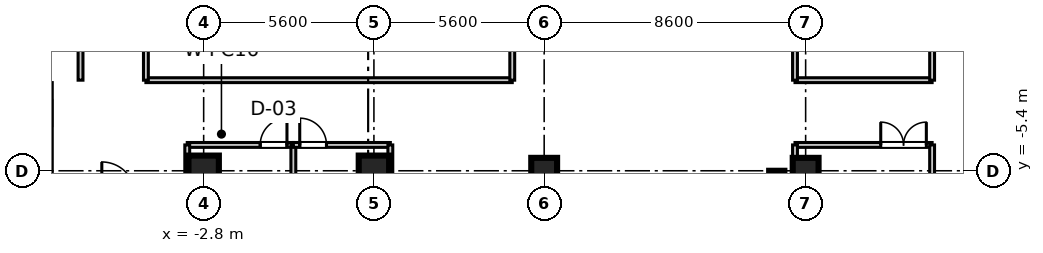
"""IFC4 building model, lengths in metres.
Left out: names, types, materials, properties, quantities, classifications, styles, units other than length and angle.
Written with IfcOpenShell. Run it as: python <this file> out.ifc"""

import sys

from ifc_helpers import new_model, si_unit, direction, frame, frame_2d, origin, origin_2d, place, context, subcontext, project, spatial, rectangle, extrude, source, transform, mapped, element, fill, save


model = new_model("IFC4")
c1 = context("Model", 3, precision=1e-05, world=origin(), true_north=direction((0.0, 1.0)))
c2 = subcontext(c1, "Body", "Model", "MODEL_VIEW")
j1 = project(units=[si_unit("LENGTHUNIT", "METRE"), si_unit("PLANEANGLEUNIT", "RADIAN")], contexts=[c1])
p1 = place(None, origin())
s1 = spatial("IfcSite", under=j1, at=p1, CompositionType="ELEMENT")
p2 = place(p1, origin())
s2 = spatial("IfcBuilding", under=s1, at=p2, CompositionType="ELEMENT")
p3 = place(p2, frame((0.0, 0.0, 249.3)))
s3 = spatial("IfcBuildingStorey", under=s2, at=p3, CompositionType="ELEMENT", Elevation=249.3)
m1 = source(origin(), c2, "Body", "SweptSolid", [
    extrude(rectangle(XDim=1.0, YDim=1.0, at=origin_2d()), origin(), (0.0, 0.0, 1.0), 3.655),
])
for number, where, z_axis, x_axis in (
    (1, (-2.8, -5.4, 0.0), (0.0, 0.0, 1.0), (1.0, 0.0, 0.0)),
    (2, (2.8, -5.4, 0.0), (0.0, 0.0, 1.0), (1.0, 0.0, 0.0)),
):
    element("IfcColumn", number, at=place(p3, frame(where, z_axis=z_axis, x_axis=x_axis)), inside=s3, PredefinedType="COLUMN", context=c2, shape_type="MappedRepresentation", body=[
        mapped(m1, transform((0.0, 0.0, 0.0), scale=1.0)),
    ])
m2 = source(origin(), c2, "Body", "SweptSolid", [
    extrude(rectangle(XDim=0.85, YDim=0.85, at=origin_2d()), origin(), (0.0, 0.0, 1.0), 3.655),
])
for number, where, z_axis, x_axis in (
    (3, (8.4, -5.4, 0.0), (0.0, 0.0, 1.0), (1.0, 0.0, 0.0)),
    (4, (17.0, -5.4, 0.0), (0.0, 0.0, 1.0), (1.0, 0.0, 0.0)),
):
    element("IfcColumn", number, at=place(p3, frame(where, z_axis=z_axis, x_axis=x_axis)), inside=s3, PredefinedType="PILASTER", context=c2, shape_type="MappedRepresentation", body=[
        mapped(m2, transform((0.0, 0.0, 0.0), scale=1.0)),
    ])
m3 = source(origin(), c2, "Body", "SweptSolid", [
    extrude(rectangle(XDim=11.6, YDim=0.5, at=frame_2d((5.8, 0.0))), origin(), (0.0, 0.0, 1.0), 3.41),
])
p4 = place(p3, frame((16.05, -17.0, 0.0), z_axis=(0.0, 0.0, 1.0), x_axis=(0.0, 1.0, 0.0)))
e5 = element("IfcWall", 5, at=p4, inside=s3, PredefinedType="SHEAR", context=c2, shape_type="MappedRepresentation", body=[
    mapped(m3, transform((0.0, 0.0, 0.0), scale=1.0)),
])
m4 = source(origin(), c2, "Body", "SweptSolid", [
    extrude(rectangle(XDim=4.51, YDim=0.16, at=frame_2d((2.255, 0.0))), origin(), (0.0, 0.0, 1.0), 2.75),
])
p5 = place(p3, frame((16.65, -4.55, 0.0), z_axis=(0.0, 0.0, 1.0), x_axis=(1.0, 0.0, 0.0)))
e6 = element("IfcWall", 6, at=p5, inside=s3, PredefinedType="PARTITIONING", context=c2, shape_type="MappedRepresentation", body=[
    mapped(m4, transform((0.0, 0.0, 0.0), scale=1.0)),
])
p6 = place(p5, frame((2.82, 0.0, 0.0)))
e7 = element("IfcOpeningElement", 7, at=p6, cuts=e6, PredefinedType="OPENING", context=c2, shape_type="SweptSolid", body=[
    extrude(rectangle(XDim=1.5, YDim=2.15, at=frame_2d((0.75, 1.075))), frame((0.0, 0.09, 0.0), z_axis=(0.0, -1.0, 0.0), x_axis=(1.0, 0.0, 0.0)), (0.0, 0.0, 1.0), 0.18),
])
m5 = source(origin(), c2, "Body", "SweptSolid", [
    extrude(rectangle(XDim=19.35, YDim=0.16, at=frame_2d((9.675, 0.0))), origin(), (0.0, 0.0, 1.0), 2.75),
])
p7 = place(p3, frame((16.65, -23.9, 0.0), z_axis=(0.0, 0.0, 1.0), x_axis=(0.0, 1.0, 0.0)))
e8 = element("IfcWall", 8, at=p7, inside=s3, PredefinedType="PARTITIONING", context=c2, shape_type="MappedRepresentation", body=[
    mapped(m5, transform((0.0, 0.0, 0.0), scale=1.0)),
])
m6 = source(origin(), c2, "Body", "SweptSolid", [
    extrude(rectangle(XDim=17.93, YDim=0.16, at=frame_2d((8.965, 0.0))), origin(), (0.0, 0.0, 1.0), 2.75),
])
p8 = place(p3, frame((21.16, -22.48, 0.0), z_axis=(0.0, 0.0, 1.0), x_axis=(0.0, 1.0, 0.0)))
e9 = element("IfcWall", 9, at=p8, inside=s3, PredefinedType="PARTITIONING", context=c2, shape_type="MappedRepresentation", body=[
    mapped(m6, transform((0.0, 0.0, 0.0), scale=1.0)),
])
m7 = source(origin(), c2, "Body", "SweptSolid", [
    extrude(rectangle(XDim=10.7, YDim=0.16, at=frame_2d((5.35, 0.0))), origin(), (0.0, 0.0, 1.0), 2.75),
])
p9 = place(p3, frame((-7.86, -13.2, 0.0), z_axis=(0.0, 0.0, 1.0), x_axis=(0.0, 1.0, 0.0)))
e10 = element("IfcWall", 10, at=p9, inside=s3, PredefinedType="PARTITIONING", context=c2, shape_type="MappedRepresentation", body=[
    mapped(m7, transform((0.0, 0.0, 0.0), scale=1.0)),
])
p10 = place(p9, frame((9.26, 0.0, 0.0)))
e11 = element("IfcOpeningElement", 11, at=p10, cuts=e10, PredefinedType="OPENING", context=c2, shape_type="SweptSolid", body=[
    extrude(rectangle(XDim=0.88, YDim=2.1, at=frame_2d((0.44, 1.05))), frame((0.0, 0.09, 0.0), z_axis=(0.0, -1.0, 0.0), x_axis=(1.0, 0.0, 0.0)), (0.0, 0.0, 1.0), 0.18),
])
m8 = source(origin(), c2, "Body", "SweptSolid", [
    extrude(rectangle(XDim=3.49, YDim=0.16, at=frame_2d((1.745, 0.0))), origin(), (0.0, 0.0, 1.0), 2.75),
])
p11 = place(p3, frame((-3.34, -4.55, 0.0), z_axis=(0.0, 0.0, 1.0), x_axis=(1.0, 0.0, 0.0)))
e12 = element("IfcWall", 12, at=p11, inside=s3, PredefinedType="PARTITIONING", context=c2, shape_type="MappedRepresentation", body=[
    mapped(m8, transform((0.0, 0.0, 0.0), scale=1.0)),
])
p12 = place(p11, frame((2.4, 0.0, 0.0)))
e13 = element("IfcOpeningElement", 13, at=p12, cuts=e12, PredefinedType="OPENING", context=c2, shape_type="SweptSolid", body=[
    extrude(rectangle(XDim=0.88, YDim=2.1, at=frame_2d((0.44, 1.05))), frame((0.0, 0.09, 0.0), z_axis=(0.0, -1.0, 0.0), x_axis=(1.0, 0.0, 0.0)), (0.0, 0.0, 1.0), 0.18),
])
for number, where, z_axis, x_axis in (
    (14, (-3.34, -23.9, 0.0), (0.0, 0.0, 1.0), (0.0, 1.0, 0.0)),
    (15, (0.15, -23.9, 0.0), (0.0, 0.0, 1.0), (0.0, 1.0, 0.0)),
):
    element("IfcWall", number, at=place(p3, frame(where, z_axis=z_axis, x_axis=x_axis)), inside=s3, PredefinedType="PARTITIONING", context=c2, shape_type="MappedRepresentation", body=[
        mapped(m5, transform((0.0, 0.0, 0.0), scale=1.0)),
    ])
m9 = source(origin(), c2, "Body", "SweptSolid", [
    extrude(rectangle(XDim=3.19, YDim=0.16, at=frame_2d((1.595, 0.0))), origin(), (0.0, 0.0, 1.0), 2.75),
])
p13 = place(p3, frame((0.15, -4.55, 0.0), z_axis=(0.0, 0.0, 1.0), x_axis=(1.0, 0.0, 0.0)))
e16 = element("IfcWall", 16, at=p13, inside=s3, PredefinedType="PARTITIONING", context=c2, shape_type="MappedRepresentation", body=[
    mapped(m9, transform((0.0, 0.0, 0.0), scale=1.0)),
])
p14 = place(p13, frame((0.21, 0.0, 0.0)))
e17 = element("IfcOpeningElement", 17, at=p14, cuts=e16, PredefinedType="OPENING", context=c2, shape_type="SweptSolid", body=[
    extrude(rectangle(XDim=0.88, YDim=2.1, at=frame_2d((0.44, 1.05))), frame((0.0, 0.09, 0.0), z_axis=(0.0, -1.0, 0.0), x_axis=(1.0, 0.0, 0.0)), (0.0, 0.0, 1.0), 0.18),
])
p15 = place(p3, frame((3.34, -23.9, 0.0), z_axis=(0.0, 0.0, 1.0), x_axis=(0.0, 1.0, 0.0)))
e18 = element("IfcWall", 18, at=p15, inside=s3, PredefinedType="PARTITIONING", context=c2, shape_type="MappedRepresentation", body=[
    mapped(m5, transform((0.0, 0.0, 0.0), scale=1.0)),
])
m10 = source(origin(), c2, "Body", "SweptSolid", [
    extrude(rectangle(XDim=4.84, YDim=0.16, at=frame_2d((2.42, 0.0))), origin(), (0.0, 0.0, 1.0), 2.75),
])
p16 = place(p3, frame((-6.85, -2.42, 0.0), z_axis=(0.0, 0.0, 1.0), x_axis=(0.0, 1.0, 0.0)))
e19 = element("IfcWall", 19, at=p16, inside=s3, PredefinedType="PARTITIONING", context=c2, shape_type="MappedRepresentation", body=[
    mapped(m10, transform((0.0, 0.0, 0.0), scale=1.0)),
])
p17 = place(p16, frame((1.945, 0.0, 0.0)))
e20 = element("IfcOpeningElement", 20, at=p17, cuts=e19, PredefinedType="OPENING", context=c2, shape_type="SweptSolid", body=[
    extrude(rectangle(XDim=0.95, YDim=2.1, at=frame_2d((0.475, 1.05))), frame((0.0, 0.09, 0.0), z_axis=(0.0, -1.0, 0.0), x_axis=(1.0, 0.0, 0.0)), (0.0, 0.0, 1.0), 0.18),
])
m11 = source(origin(), c2, "Body", "SweptSolid", [
    extrude(rectangle(XDim=12.05, YDim=0.16, at=frame_2d((6.025, 0.0))), origin(), (0.0, 0.0, 1.0), 2.75),
])
p18 = place(p3, frame((-4.7, -2.42, 0.0), z_axis=(0.0, 0.0, 1.0), x_axis=(1.0, 0.0, 0.0)))
e21 = element("IfcWall", 21, at=p18, inside=s3, PredefinedType="PARTITIONING", context=c2, shape_type="MappedRepresentation", body=[
    mapped(m11, transform((0.0, 0.0, 0.0), scale=1.0)),
])
for number, where, z_axis, x_axis in (
    (22, (-4.7, -2.42, 0.0), (0.0, 0.0, 1.0), (0.0, 1.0, 0.0)),
    (23, (7.35, -2.42, 0.0), (0.0, 0.0, 1.0), (0.0, 1.0, 0.0)),
):
    element("IfcWall", number, at=place(p3, frame(where, z_axis=z_axis, x_axis=x_axis)), inside=s3, PredefinedType="PARTITIONING", context=c2, shape_type="MappedRepresentation", body=[
        mapped(m10, transform((0.0, 0.0, 0.0), scale=1.0)),
    ])
p19 = place(p3, frame((16.65, -2.42, 0.0), z_axis=(0.0, 0.0, 1.0), x_axis=(1.0, 0.0, 0.0)))
e24 = element("IfcWall", 24, at=p19, inside=s3, PredefinedType="PARTITIONING", context=c2, shape_type="MappedRepresentation", body=[
    mapped(m4, transform((0.0, 0.0, 0.0), scale=1.0)),
])
for number, where, z_axis, x_axis in (
    (25, (16.65, -2.42, 0.0), (0.0, 0.0, 1.0), (0.0, 1.0, 0.0)),
    (26, (21.16, -2.42, 0.0), (0.0, 0.0, 1.0), (0.0, 1.0, 0.0)),
):
    element("IfcWall", number, at=place(p3, frame(where, z_axis=z_axis, x_axis=x_axis)), inside=s3, PredefinedType="PARTITIONING", context=c2, shape_type="MappedRepresentation", body=[
        mapped(m10, transform((0.0, 0.0, 0.0), scale=1.0)),
    ])
m12 = source(origin(), c2, "Body", "SweptSolid", [
    extrude(rectangle(XDim=1.5, YDim=2.15, at=frame_2d((0.75, 1.075))), frame((0.0, 0.025, 0.0), z_axis=(0.0, -1.0, 0.0), x_axis=(1.0, 0.0, 0.0)), (0.0, 0.0, 1.0), 0.05),
])
p20 = place(p6, frame((1.5, 0.0, 0.0), z_axis=(0.0, 0.0, 1.0), x_axis=(-1.0, 0.0, 0.0)))
e27 = element("IfcDoor", 27, at=p20, inside=s3, OperationType="DOUBLE_DOOR_SINGLE_SWING", PredefinedType="DOOR", context=c2, shape_type="MappedRepresentation", body=[
    mapped(m12, transform((0.0, 0.0, 0.0), scale=1.0)),
])
fill(e7, e27)
m13 = source(origin(), c2, "Body", "SweptSolid", [
    extrude(rectangle(XDim=0.88, YDim=2.1, at=frame_2d((0.44, 1.05))), frame((0.0, 0.025, 0.0), z_axis=(0.0, -1.0, 0.0), x_axis=(1.0, 0.0, 0.0)), (0.0, 0.0, 1.0), 0.05),
])
p21 = place(p12, frame((0.88, 0.0, 0.0), z_axis=(0.0, 0.0, 1.0), x_axis=(-1.0, 0.0, 0.0)))
e28 = element("IfcDoor", 28, at=p21, inside=s3, OperationType="SINGLE_SWING_RIGHT", PredefinedType="DOOR", context=c2, shape_type="MappedRepresentation", body=[
    mapped(m13, transform((0.0, 0.0, 0.0), scale=1.0)),
])
fill(e13, e28)
p22 = place(p14, frame((0.88, 0.0, 0.0), z_axis=(0.0, 0.0, 1.0), x_axis=(-1.0, 0.0, 0.0)))
e29 = element("IfcDoor", 29, at=p22, inside=s3, OperationType="SINGLE_SWING_LEFT", PredefinedType="DOOR", context=c2, shape_type="MappedRepresentation", body=[
    mapped(m13, transform((0.0, 0.0, 0.0), scale=1.0)),
])
fill(e17, e29)
save(model, sys.argv[1])
